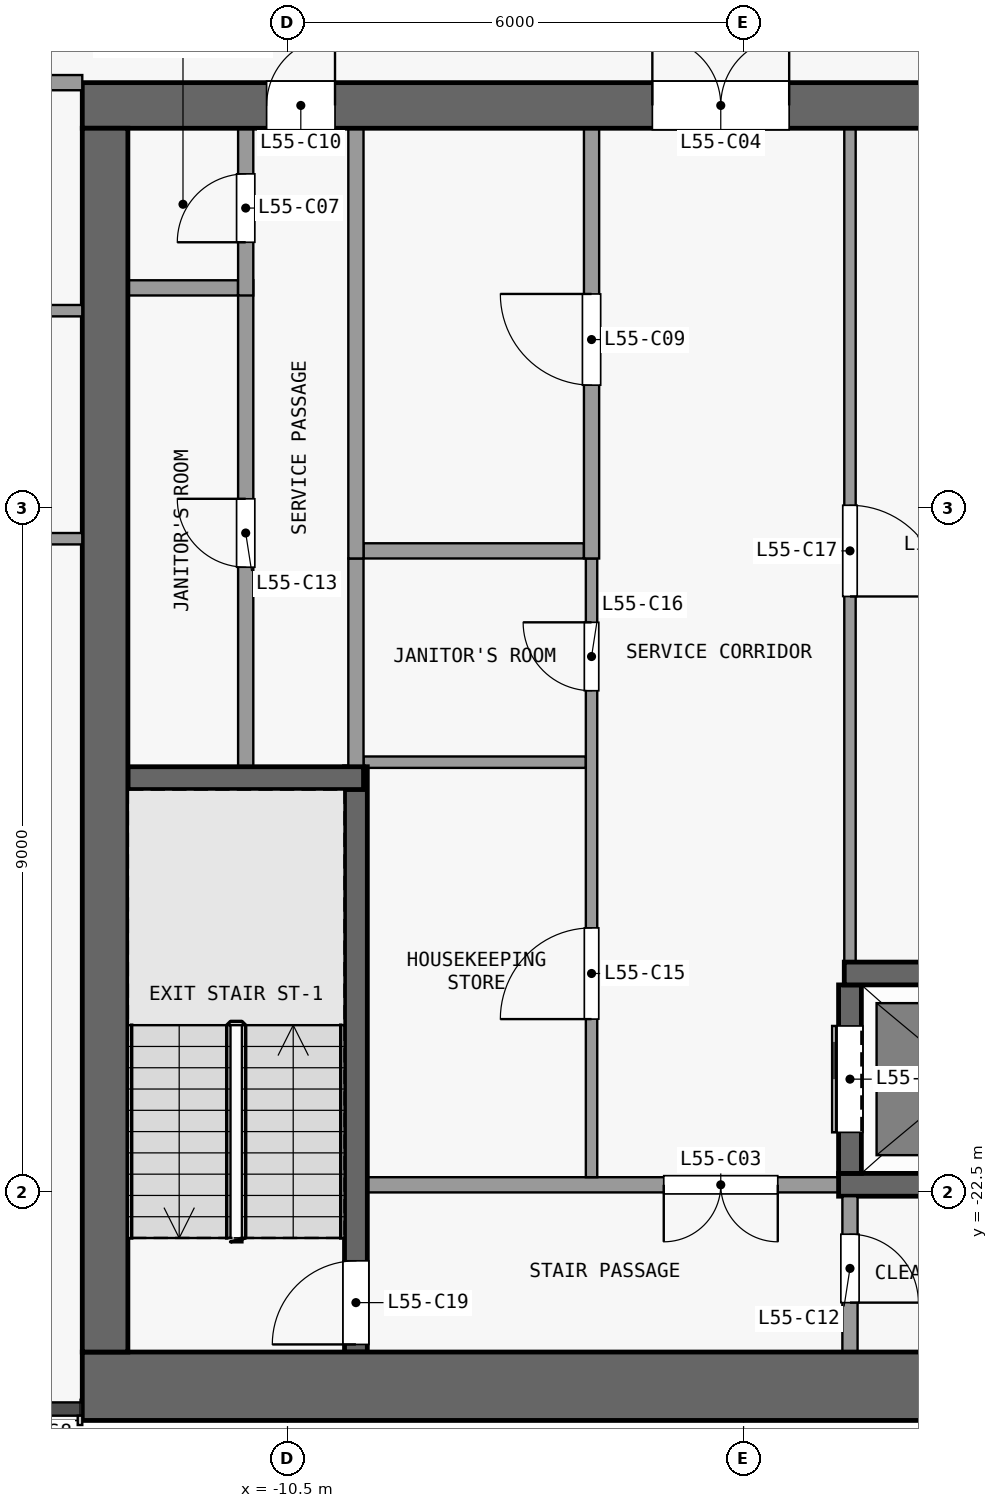
"""IFC4 building model, lengths in metres.
Left out: names, types, materials, properties, quantities, classifications, styles, units other than length and angle.
Written with IfcOpenShell. Run it as: python <this file> out.ifc"""

import sys

from ifc_helpers import new_model, si_unit, direction, frame, frame_2d, origin, place, context, subcontext, project, spatial, rectangle, extrude, element, fill, save


model = new_model("IFC4")
c1 = context("Model", 3, precision=1e-05, world=origin(), true_north=direction((0.0, 1.0)))
c2 = subcontext(c1, "Body", "Model", "MODEL_VIEW")
j1 = project(units=[si_unit("LENGTHUNIT", "METRE"), si_unit("PLANEANGLEUNIT", "RADIAN")], contexts=[c1])
p1 = place(None, origin())
s1 = spatial("IfcSite", under=j1, at=p1, CompositionType="ELEMENT")
p2 = place(p1, origin())
s2 = spatial("IfcBuilding", under=s1, at=p2, CompositionType="ELEMENT")
p3 = place(p2, frame((0.0, 0.0, 219.5)))
s3 = spatial("IfcBuildingStorey", under=s2, at=p3, CompositionType="ELEMENT", Elevation=219.5)
p4 = place(p3, frame((-13.2, -25.05, 0.0), z_axis=(0.0, 0.0, 1.0), x_axis=(1.0, 0.0, 0.0)))
e1 = element("IfcWall", 1, at=p4, inside=s3, PredefinedType="SHEAR", context=c2, shape_type="SweptSolid", body=[
    extrude(rectangle(XDim=26.4, YDim=0.9, at=frame_2d((13.2, 0.0))), origin(), (0.0, 0.0, 1.0), 3.3),
])
p5 = place(p3, frame((-13.2, -8.2, 0.0), z_axis=(0.0, 0.0, 1.0), x_axis=(1.0, 0.0, 0.0)))
e2 = element("IfcWall", 2, at=p5, inside=s3, PredefinedType="SHEAR", context=c2, shape_type="SweptSolid", body=[
    extrude(rectangle(XDim=26.4, YDim=0.6, at=frame_2d((13.2, 0.0))), origin(), (0.0, 0.0, 1.0), 3.3),
])
p6 = place(p5, frame((7.5, 0.0, 0.0)))
e3 = element("IfcOpeningElement", 3, at=p6, cuts=e2, PredefinedType="OPENING", context=c2, shape_type="SweptSolid", body=[
    extrude(rectangle(XDim=1.8, YDim=2.1, at=frame_2d((0.9, 1.05))), frame((0.0, 0.31, 0.0), z_axis=(0.0, -1.0, 0.0), x_axis=(1.0, 0.0, 0.0)), (0.0, 0.0, 1.0), 0.62),
])
p7 = place(p5, frame((17.1, 0.0, 0.0)))
e4 = element("IfcOpeningElement", 4, at=p7, cuts=e2, PredefinedType="OPENING", context=c2, shape_type="SweptSolid", body=[
    extrude(rectangle(XDim=1.8, YDim=2.1, at=frame_2d((0.9, 1.05))), frame((0.0, 0.31, 0.0), z_axis=(0.0, -1.0, 0.0), x_axis=(1.0, 0.0, 0.0)), (0.0, 0.0, 1.0), 0.62),
])
p8 = place(p5, frame((2.425, 0.0, 0.0)))
e5 = element("IfcOpeningElement", 5, at=p8, cuts=e2, PredefinedType="OPENING", context=c2, shape_type="SweptSolid", body=[
    extrude(rectangle(XDim=0.9, YDim=2.1, at=frame_2d((0.45, 1.05))), frame((0.0, 0.31, 0.0), z_axis=(0.0, -1.0, 0.0), x_axis=(1.0, 0.0, 0.0)), (0.0, 0.0, 1.0), 0.62),
])
p9 = place(p5, frame((23.075, 0.0, 0.0)))
e6 = element("IfcOpeningElement", 6, at=p9, cuts=e2, PredefinedType="OPENING", context=c2, shape_type="SweptSolid", body=[
    extrude(rectangle(XDim=0.9, YDim=2.1, at=frame_2d((0.45, 1.05))), frame((0.0, 0.31, 0.0), z_axis=(0.0, -1.0, 0.0), x_axis=(1.0, 0.0, 0.0)), (0.0, 0.0, 1.0), 0.62),
])
p10 = place(p3, frame((-12.9, -24.6, 0.0), z_axis=(0.0, 0.0, 1.0), x_axis=(0.0, 1.0, 0.0)))
e7 = element("IfcWall", 7, at=p10, inside=s3, PredefinedType="SHEAR", context=c2, shape_type="SweptSolid", body=[
    extrude(rectangle(XDim=16.1, YDim=0.6, at=frame_2d((8.05, 0.0))), origin(), (0.0, 0.0, 1.0), 3.3),
])
p11 = place(p3, frame((-3.25, -22.4, 0.0), z_axis=(0.0, 0.0, 1.0), x_axis=(-1.0, 0.0, 0.0)))
e8 = element("IfcWall", 8, at=p11, inside=s3, PredefinedType="PARTITIONING", context=c2, shape_type="SweptSolid", body=[
    extrude(rectangle(XDim=6.2, YDim=0.2, at=frame_2d((3.1, 0.0))), origin(), (0.0, 0.0, 1.0), 3.3),
])
p12 = place(p11, frame((0.8, 0.0, 0.0)))
e9 = element("IfcOpeningElement", 9, at=p12, cuts=e8, PredefinedType="OPENING", context=c2, shape_type="SweptSolid", body=[
    extrude(rectangle(XDim=1.5, YDim=2.1, at=frame_2d((0.75, 1.05))), frame((0.0, 0.11, 0.0), z_axis=(0.0, -1.0, 0.0), x_axis=(1.0, 0.0, 0.0)), (0.0, 0.0, 1.0), 0.22),
])
p13 = place(p3, frame((-3.25, -22.4, 0.0), z_axis=(0.0, 0.0, 1.0), x_axis=(1.0, 0.0, 0.0)))
e10 = element("IfcWall", 10, at=p13, inside=s3, PredefinedType="SHEAR", context=c2, shape_type="SweptSolid", body=[
    extrude(rectangle(XDim=6.5, YDim=0.3, at=frame_2d((3.25, 0.0))), origin(), (0.0, 0.0, 1.0), 3.3),
])
p14 = place(p3, frame((-3.175, -19.62, 0.0), z_axis=(0.0, 0.0, 1.0), x_axis=(1.0, 0.0, 0.0)))
e11 = element("IfcWall", 11, at=p14, inside=s3, PredefinedType="SHEAR", context=c2, shape_type="SweptSolid", body=[
    extrude(rectangle(XDim=3.025, YDim=0.3, at=frame_2d((1.513, 0.0))), origin(), (0.0, 0.0, 1.0), 3.3),
])
p15 = place(p3, frame((-12.6, -17.05, 0.0), z_axis=(0.0, 0.0, 1.0), x_axis=(1.0, 0.0, 0.0)))
e12 = element("IfcWall", 12, at=p15, inside=s3, PredefinedType="SHEAR", context=c2, shape_type="SweptSolid", body=[
    extrude(rectangle(XDim=3.1, YDim=0.3, at=frame_2d((1.55, 0.0))), origin(), (0.0, 0.0, 1.0), 3.3),
])
p16 = place(p3, frame((-9.5, -16.84, 0.0), z_axis=(0.0, 0.0, 1.0), x_axis=(1.0, 0.0, 0.0)))
e13 = element("IfcWall", 13, at=p16, inside=s3, PredefinedType="PARTITIONING", context=c2, shape_type="SweptSolid", body=[
    extrude(rectangle(XDim=2.925, YDim=0.15, at=frame_2d((1.462, 0.0))), origin(), (0.0, 0.0, 1.0), 3.3),
])
p17 = place(p3, frame((-9.5, -14.06, 0.0), z_axis=(0.0, 0.0, 1.0), x_axis=(1.0, 0.0, 0.0)))
e14 = element("IfcWall", 14, at=p17, inside=s3, PredefinedType="PARTITIONING", context=c2, shape_type="SweptSolid", body=[
    extrude(rectangle(XDim=2.9, YDim=0.2, at=frame_2d((1.45, 0.0))), origin(), (0.0, 0.0, 1.0), 3.3),
])
p18 = place(p3, frame((-12.6, -10.6, 0.0), z_axis=(0.0, 0.0, 1.0), x_axis=(1.0, 0.0, 0.0)))
e15 = element("IfcWall", 15, at=p18, inside=s3, PredefinedType="PARTITIONING", context=c2, shape_type="SweptSolid", body=[
    extrude(rectangle(XDim=1.45, YDim=0.2, at=frame_2d((0.725, 0.0))), origin(), (0.0, 0.0, 1.0), 3.3),
])
p19 = place(p3, frame((-11.05, -16.9, 0.0), z_axis=(0.0, 0.0, 1.0), x_axis=(0.0, 1.0, 0.0)))
e16 = element("IfcWall", 16, at=p19, inside=s3, PredefinedType="PARTITIONING", context=c2, shape_type="SweptSolid", body=[
    extrude(rectangle(XDim=6.4, YDim=0.2, at=frame_2d((3.2, 0.0))), origin(), (0.0, 0.0, 1.0), 3.3),
])
p20 = place(p19, frame((2.625, 0.0, 0.0)))
e17 = element("IfcOpeningElement", 17, at=p20, cuts=e16, PredefinedType="OPENING", context=c2, shape_type="SweptSolid", body=[
    extrude(rectangle(XDim=0.9, YDim=2.1, at=frame_2d((0.45, 1.05))), frame((0.0, 0.11, 0.0), z_axis=(0.0, -1.0, 0.0), x_axis=(1.0, 0.0, 0.0)), (0.0, 0.0, 1.0), 0.22),
])
p21 = place(p3, frame((-11.05, -10.7, 0.0), z_axis=(0.0, 0.0, 1.0), x_axis=(0.0, 1.0, 0.0)))
e18 = element("IfcWall", 18, at=p21, inside=s3, PredefinedType="PARTITIONING", context=c2, shape_type="SweptSolid", body=[
    extrude(rectangle(XDim=2.2, YDim=0.2, at=frame_2d((1.1, 0.0))), origin(), (0.0, 0.0, 1.0), 3.3),
])
p22 = place(p21, frame((0.7, 0.0, 0.0)))
e19 = element("IfcOpeningElement", 19, at=p22, cuts=e18, PredefinedType="OPENING", context=c2, shape_type="SweptSolid", body=[
    extrude(rectangle(XDim=0.9, YDim=2.1, at=frame_2d((0.45, 1.05))), frame((0.0, 0.11, 0.0), z_axis=(0.0, -1.0, 0.0), x_axis=(1.0, 0.0, 0.0)), (0.0, 0.0, 1.0), 0.22),
])
p23 = place(p3, frame((-9.6, -24.6, 0.0), z_axis=(0.0, 0.0, 1.0), x_axis=(0.0, 1.0, 0.0)))
e20 = element("IfcWall", 20, at=p23, inside=s3, PredefinedType="SHEAR", context=c2, shape_type="SweptSolid", body=[
    extrude(rectangle(XDim=7.7, YDim=0.3, at=frame_2d((3.85, 0.0))), origin(), (0.0, 0.0, 1.0), 3.3),
])
p24 = place(p23, frame((0.1, 0.0, 0.0)))
e21 = element("IfcOpeningElement", 21, at=p24, cuts=e20, PredefinedType="OPENING", context=c2, shape_type="SweptSolid", body=[
    extrude(rectangle(XDim=1.1, YDim=2.1, at=frame_2d((0.55, 1.05))), frame((0.0, 0.16, 0.0), z_axis=(0.0, -1.0, 0.0), x_axis=(1.0, 0.0, 0.0)), (0.0, 0.0, 1.0), 0.32),
])
p25 = place(p3, frame((-9.6, -16.9, 0.0), z_axis=(0.0, 0.0, 1.0), x_axis=(0.0, 1.0, 0.0)))
e22 = element("IfcWall", 22, at=p25, inside=s3, PredefinedType="PARTITIONING", context=c2, shape_type="SweptSolid", body=[
    extrude(rectangle(XDim=2.74, YDim=0.2, at=frame_2d((1.37, 0.0))), origin(), (0.0, 0.0, 1.0), 3.3),
])
p26 = place(p3, frame((-9.6, -14.16, 0.0), z_axis=(0.0, 0.0, 1.0), x_axis=(0.0, 1.0, 0.0)))
e23 = element("IfcWall", 23, at=p26, inside=s3, PredefinedType="PARTITIONING", context=c2, shape_type="SweptSolid", body=[
    extrude(rectangle(XDim=5.66, YDim=0.2, at=frame_2d((2.83, 0.0))), origin(), (0.0, 0.0, 1.0), 3.3),
])
p27 = place(p3, frame((-6.5, -22.3, 0.0), z_axis=(0.0, 0.0, 1.0), x_axis=(0.0, 1.0, 0.0)))
e24 = element("IfcWall", 24, at=p27, inside=s3, PredefinedType="PARTITIONING", context=c2, shape_type="SweptSolid", body=[
    extrude(rectangle(XDim=8.14, YDim=0.15, at=frame_2d((4.07, 0.0))), origin(), (0.0, 0.0, 1.0), 3.3),
])
p28 = place(p27, frame((2.08, 0.0, 0.0)))
e25 = element("IfcOpeningElement", 25, at=p28, cuts=e24, PredefinedType="OPENING", context=c2, shape_type="SweptSolid", body=[
    extrude(rectangle(XDim=1.2, YDim=2.1, at=frame_2d((0.6, 1.05))), frame((0.0, 0.085, 0.0), z_axis=(0.0, -1.0, 0.0), x_axis=(1.0, 0.0, 0.0)), (0.0, 0.0, 1.0), 0.17),
])
p29 = place(p27, frame((6.4, 0.0, 0.0)))
e26 = element("IfcOpeningElement", 26, at=p29, cuts=e24, PredefinedType="OPENING", context=c2, shape_type="SweptSolid", body=[
    extrude(rectangle(XDim=0.9, YDim=2.1, at=frame_2d((0.45, 1.05))), frame((0.0, 0.085, 0.0), z_axis=(0.0, -1.0, 0.0), x_axis=(1.0, 0.0, 0.0)), (0.0, 0.0, 1.0), 0.17),
])
p30 = place(p3, frame((-6.5, -14.16, 0.0), z_axis=(0.0, 0.0, 1.0), x_axis=(0.0, 1.0, 0.0)))
e27 = element("IfcWall", 27, at=p30, inside=s3, PredefinedType="PARTITIONING", context=c2, shape_type="SweptSolid", body=[
    extrude(rectangle(XDim=5.66, YDim=0.2, at=frame_2d((2.83, 0.0))), origin(), (0.0, 0.0, 1.0), 3.3),
])
p31 = place(p30, frame((2.28, 0.0, 0.0)))
e28 = element("IfcOpeningElement", 28, at=p31, cuts=e27, PredefinedType="OPENING", context=c2, shape_type="SweptSolid", body=[
    extrude(rectangle(XDim=1.2, YDim=2.1, at=frame_2d((0.6, 1.05))), frame((0.0, 0.11, 0.0), z_axis=(0.0, -1.0, 0.0), x_axis=(1.0, 0.0, 0.0)), (0.0, 0.0, 1.0), 0.22),
])
p32 = place(p3, frame((-3.1, -22.55, 0.0), z_axis=(0.0, 0.0, 1.0), x_axis=(0.0, -1.0, 0.0)))
e29 = element("IfcWall", 29, at=p32, inside=s3, PredefinedType="PARTITIONING", context=c2, shape_type="SweptSolid", body=[
    extrude(rectangle(XDim=2.05, YDim=0.2, at=frame_2d((1.025, 0.0))), origin(), (0.0, 0.0, 1.0), 3.3),
])
p33 = place(p32, frame((0.5, 0.0, 0.0)))
e30 = element("IfcOpeningElement", 30, at=p33, cuts=e29, PredefinedType="OPENING", context=c2, shape_type="SweptSolid", body=[
    extrude(rectangle(XDim=0.9, YDim=2.1, at=frame_2d((0.45, 1.05))), frame((0.0, 0.11, 0.0), z_axis=(0.0, -1.0, 0.0), x_axis=(1.0, 0.0, 0.0)), (0.0, 0.0, 1.0), 0.22),
])
p34 = place(p3, frame((-3.1, -22.25, 0.0), z_axis=(0.0, 0.0, 1.0), x_axis=(0.0, 1.0, 0.0)))
e31 = element("IfcWall", 31, at=p34, inside=s3, PredefinedType="SHEAR", context=c2, shape_type="SweptSolid", body=[
    extrude(rectangle(XDim=2.48, YDim=0.3, at=frame_2d((1.24, 0.0))), origin(), (0.0, 0.0, 1.0), 3.3),
])
p35 = place(p34, frame((0.54, 0.0, 0.0)))
e32 = element("IfcOpeningElement", 32, at=p35, cuts=e31, PredefinedType="OPENING", context=c2, shape_type="SweptSolid", body=[
    extrude(rectangle(XDim=1.4, YDim=2.1, at=frame_2d((0.7, 1.05))), frame((0.0, 0.16, 0.0), z_axis=(0.0, -1.0, 0.0), x_axis=(1.0, 0.0, 0.0)), (0.0, 0.0, 1.0), 0.32),
])
p36 = place(p3, frame((-3.1, -8.5, 0.0), z_axis=(0.0, 0.0, 1.0), x_axis=(0.0, -1.0, 0.0)))
e33 = element("IfcWall", 33, at=p36, inside=s3, PredefinedType="PARTITIONING", context=c2, shape_type="SweptSolid", body=[
    extrude(rectangle(XDim=10.97, YDim=0.15, at=frame_2d((5.485, 0.0))), origin(), (0.0, 0.0, 1.0), 3.3),
])
p37 = place(p36, frame((4.96, 0.0, 0.0)))
e34 = element("IfcOpeningElement", 34, at=p37, cuts=e33, PredefinedType="OPENING", context=c2, shape_type="SweptSolid", body=[
    extrude(rectangle(XDim=1.2, YDim=2.1, at=frame_2d((0.6, 1.05))), frame((0.0, 0.085, 0.0), z_axis=(0.0, -1.0, 0.0), x_axis=(1.0, 0.0, 0.0)), (0.0, 0.0, 1.0), 0.17),
])
p38 = place(p3, frame((-19.262, -13.9, 0.0), z_axis=(0.0, 0.0, 1.0), x_axis=(1.0, 0.0, 0.0)))
e35 = element("IfcWall", 35, at=p38, inside=s3, PredefinedType="PARTITIONING", context=c2, shape_type="SweptSolid", body=[
    extrude(rectangle(XDim=6.062, YDim=0.15, at=frame_2d((3.031, 0.0))), origin(), (0.0, 0.0, 1.0), 3.3),
])
p39 = place(p38, frame((0.712, 0.0, 0.0)))
e36 = element("IfcOpeningElement", 36, at=p39, cuts=e35, PredefinedType="OPENING", context=c2, shape_type="SweptSolid", body=[
    extrude(rectangle(XDim=0.9, YDim=2.1, at=frame_2d((0.45, 1.05))), frame((0.0, 0.085, 0.0), z_axis=(0.0, -1.0, 0.0), x_axis=(1.0, 0.0, 0.0)), (0.0, 0.0, 1.0), 0.17),
])
p40 = place(p3, frame((-19.262, -10.9, 0.0), z_axis=(0.0, 0.0, 1.0), x_axis=(1.0, 0.0, 0.0)))
e37 = element("IfcWall", 37, at=p40, inside=s3, PredefinedType="PARTITIONING", context=c2, shape_type="SweptSolid", body=[
    extrude(rectangle(XDim=6.062, YDim=0.15, at=frame_2d((3.031, 0.0))), origin(), (0.0, 0.0, 1.0), 3.3),
])
p41 = place(p40, frame((1.012, 0.0, 0.0)))
e38 = element("IfcOpeningElement", 38, at=p41, cuts=e37, PredefinedType="OPENING", context=c2, shape_type="SweptSolid", body=[
    extrude(rectangle(XDim=0.9, YDim=2.1, at=frame_2d((0.45, 1.05))), frame((0.0, 0.085, 0.0), z_axis=(0.0, -1.0, 0.0), x_axis=(1.0, 0.0, 0.0)), (0.0, 0.0, 1.0), 0.17),
])
p42 = place(p40, frame((4.162, 0.0, 0.0)))
e39 = element("IfcOpeningElement", 39, at=p42, cuts=e37, PredefinedType="OPENING", context=c2, shape_type="SweptSolid", body=[
    extrude(rectangle(XDim=0.9, YDim=2.1, at=frame_2d((0.45, 1.05))), frame((0.0, 0.085, 0.0), z_axis=(0.0, -1.0, 0.0), x_axis=(1.0, 0.0, 0.0)), (0.0, 0.0, 1.0), 0.17),
])
p43 = place(p3, frame((-19.262, -7.9, 0.0), z_axis=(0.0, 0.0, 1.0), x_axis=(1.0, 0.0, 0.0)))
e40 = element("IfcWall", 40, at=p43, inside=s3, PredefinedType="PARTITIONING", context=c2, shape_type="SweptSolid", body=[
    extrude(rectangle(XDim=6.062, YDim=0.2, at=frame_2d((3.031, 0.0))), origin(), (0.0, 0.0, 1.0), 3.3),
])
p44 = place(p43, frame((2.512, 0.0, 0.0)))
e41 = element("IfcOpeningElement", 41, at=p44, cuts=e40, PredefinedType="OPENING", context=c2, shape_type="SweptSolid", body=[
    extrude(rectangle(XDim=1.0, YDim=2.1, at=frame_2d((0.5, 1.05))), frame((0.0, 0.11, 0.0), z_axis=(0.0, -1.0, 0.0), x_axis=(1.0, 0.0, 0.0)), (0.0, 0.0, 1.0), 0.22),
])
p45 = place(p35, origin())
e42 = element("IfcDoor", 42, at=p45, inside=s3, OperationType="DOUBLE_DOOR_SLIDING", PredefinedType="DOOR", context=c2, shape_type="SweptSolid", body=[
    extrude(rectangle(XDim=1.4, YDim=2.1, at=frame_2d((0.7, 1.05))), frame((0.0, 0.025, 0.0), z_axis=(0.0, -1.0, 0.0), x_axis=(1.0, 0.0, 0.0)), (0.0, 0.0, 1.0), 0.05),
])
fill(e32, e42)
p46 = place(p12, origin())
e43 = element("IfcDoor", 43, at=p46, inside=s3, OperationType="DOUBLE_DOOR_SINGLE_SWING", PredefinedType="DOOR", context=c2, shape_type="SweptSolid", body=[
    extrude(rectangle(XDim=1.5, YDim=2.1, at=frame_2d((0.75, 1.05))), frame((0.0, 0.025, 0.0), z_axis=(0.0, -1.0, 0.0), x_axis=(1.0, 0.0, 0.0)), (0.0, 0.0, 1.0), 0.05),
])
fill(e9, e43)
p47 = place(p6, origin())
e44 = element("IfcDoor", 44, at=p47, inside=s3, OperationType="DOUBLE_DOOR_SINGLE_SWING", PredefinedType="DOOR", context=c2, shape_type="SweptSolid", body=[
    extrude(rectangle(XDim=1.8, YDim=2.1, at=frame_2d((0.9, 1.05))), frame((0.0, 0.025, 0.0), z_axis=(0.0, -1.0, 0.0), x_axis=(1.0, 0.0, 0.0)), (0.0, 0.0, 1.0), 0.05),
])
fill(e3, e44)
p48 = place(p22, origin())
e45 = element("IfcDoor", 45, at=p48, inside=s3, OperationType="SINGLE_SWING_LEFT", PredefinedType="DOOR", context=c2, shape_type="SweptSolid", body=[
    extrude(rectangle(XDim=0.9, YDim=2.1, at=frame_2d((0.45, 1.05))), frame((0.0, 0.025, 0.0), z_axis=(0.0, -1.0, 0.0), x_axis=(1.0, 0.0, 0.0)), (0.0, 0.0, 1.0), 0.05),
])
fill(e19, e45)
p49 = place(p31, origin())
e46 = element("IfcDoor", 46, at=p49, inside=s3, OperationType="SINGLE_SWING_RIGHT", PredefinedType="DOOR", context=c2, shape_type="SweptSolid", body=[
    extrude(rectangle(XDim=1.2, YDim=2.1, at=frame_2d((0.6, 1.05))), frame((0.0, 0.025, 0.0), z_axis=(0.0, -1.0, 0.0), x_axis=(1.0, 0.0, 0.0)), (0.0, 0.0, 1.0), 0.05),
])
fill(e28, e46)
p50 = place(p8, origin())
e47 = element("IfcDoor", 47, at=p50, inside=s3, OperationType="SINGLE_SWING_RIGHT", PredefinedType="DOOR", context=c2, shape_type="SweptSolid", body=[
    extrude(rectangle(XDim=0.9, YDim=2.1, at=frame_2d((0.45, 1.05))), frame((0.0, 0.025, 0.0), z_axis=(0.0, -1.0, 0.0), x_axis=(1.0, 0.0, 0.0)), (0.0, 0.0, 1.0), 0.05),
])
fill(e5, e47)
p51 = place(p33, origin())
e48 = element("IfcDoor", 48, at=p51, inside=s3, OperationType="SINGLE_SWING_RIGHT", PredefinedType="DOOR", context=c2, shape_type="SweptSolid", body=[
    extrude(rectangle(XDim=0.9, YDim=2.1, at=frame_2d((0.45, 1.05))), frame((0.0, 0.025, 0.0), z_axis=(0.0, -1.0, 0.0), x_axis=(1.0, 0.0, 0.0)), (0.0, 0.0, 1.0), 0.05),
])
fill(e30, e48)
p52 = place(p20, origin())
e49 = element("IfcDoor", 49, at=p52, inside=s3, OperationType="SINGLE_SWING_RIGHT", PredefinedType="DOOR", context=c2, shape_type="SweptSolid", body=[
    extrude(rectangle(XDim=0.9, YDim=2.1, at=frame_2d((0.45, 1.05))), frame((0.0, 0.025, 0.0), z_axis=(0.0, -1.0, 0.0), x_axis=(1.0, 0.0, 0.0)), (0.0, 0.0, 1.0), 0.05),
])
fill(e17, e49)
p53 = place(p28, origin())
e50 = element("IfcDoor", 50, at=p53, inside=s3, OperationType="SINGLE_SWING_LEFT", PredefinedType="DOOR", context=c2, shape_type="SweptSolid", body=[
    extrude(rectangle(XDim=1.2, YDim=2.1, at=frame_2d((0.6, 1.05))), frame((0.0, 0.025, 0.0), z_axis=(0.0, -1.0, 0.0), x_axis=(1.0, 0.0, 0.0)), (0.0, 0.0, 1.0), 0.05),
])
fill(e25, e50)
p54 = place(p29, origin())
e51 = element("IfcDoor", 51, at=p54, inside=s3, OperationType="SINGLE_SWING_RIGHT", PredefinedType="DOOR", context=c2, shape_type="SweptSolid", body=[
    extrude(rectangle(XDim=0.9, YDim=2.1, at=frame_2d((0.45, 1.05))), frame((0.0, 0.025, 0.0), z_axis=(0.0, -1.0, 0.0), x_axis=(1.0, 0.0, 0.0)), (0.0, 0.0, 1.0), 0.05),
])
fill(e26, e51)
p55 = place(p37, origin())
e52 = element("IfcDoor", 52, at=p55, inside=s3, OperationType="SINGLE_SWING_RIGHT", PredefinedType="DOOR", context=c2, shape_type="SweptSolid", body=[
    extrude(rectangle(XDim=1.2, YDim=2.1, at=frame_2d((0.6, 1.05))), frame((0.0, 0.025, 0.0), z_axis=(0.0, -1.0, 0.0), x_axis=(1.0, 0.0, 0.0)), (0.0, 0.0, 1.0), 0.05),
])
fill(e34, e52)
p56 = place(p24, origin())
e53 = element("IfcDoor", 53, at=p56, inside=s3, OperationType="SINGLE_SWING_LEFT", PredefinedType="DOOR", context=c2, shape_type="SweptSolid", body=[
    extrude(rectangle(XDim=1.1, YDim=2.1, at=frame_2d((0.55, 1.05))), frame((0.0, 0.025, 0.0), z_axis=(0.0, -1.0, 0.0), x_axis=(1.0, 0.0, 0.0)), (0.0, 0.0, 1.0), 0.05),
])
fill(e21, e53)
save(model, sys.argv[1])
